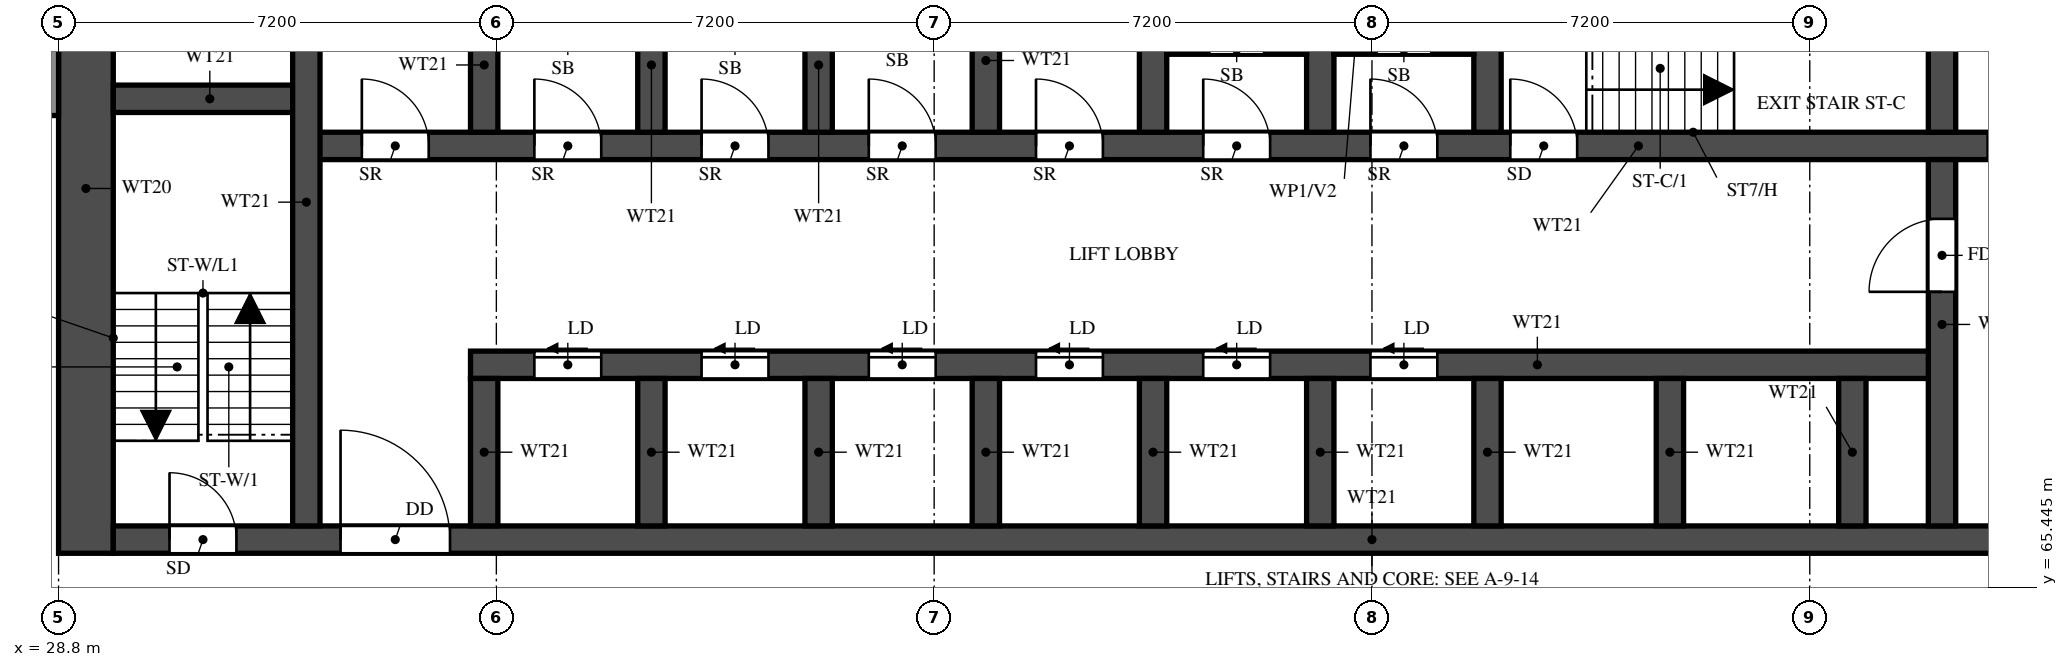
"""IFC4 building model, lengths in metres.
Left out: names, types, materials, properties, quantities, classifications, styles, units other than length and angle.
Written with IfcOpenShell. Run it as: python <this file> out.ifc"""

import sys

from ifc_helpers import new_model, si_unit, direction, frame, frame_2d, origin, place, context, subcontext, project, spatial, rectangle, extrude, element, fill, save


model = new_model("IFC4")
c1 = context("Model", 3, precision=1e-05, world=origin(), true_north=direction((0.0, 1.0)))
c2 = subcontext(c1, "Body", "Model", "MODEL_VIEW")
j1 = project(units=[si_unit("LENGTHUNIT", "METRE"), si_unit("PLANEANGLEUNIT", "RADIAN")], contexts=[c1])
p1 = place(None, origin())
s1 = spatial("IfcSite", under=j1, at=p1, CompositionType="ELEMENT")
p2 = place(p1, origin())
s2 = spatial("IfcBuilding", under=s1, at=p2, CompositionType="ELEMENT")
p3 = place(p2, frame((0.0, 0.0, 93.5)))
s3 = spatial("IfcBuildingStorey", under=s2, at=p3, CompositionType="ELEMENT", Elevation=93.5)
p4 = place(p3, frame((29.25, 66.0, 0.0), z_axis=(0.0, 0.0, 1.0), x_axis=(0.0, 1.0, 0.0)))
e1 = element("IfcWall", 1, at=p4, inside=s3, PredefinedType="SHEAR", context=c2, shape_type="SweptSolid", body=[
    extrude(rectangle(XDim=12.0, YDim=0.9, at=frame_2d((6.0, 0.0))), origin(), (0.0, 0.0, 1.0), 3.18),
])
p5 = place(p3, frame((29.7, 66.225, 0.0), z_axis=(0.0, 0.0, 1.0), x_axis=(1.0, 0.0, 0.0)))
e2 = element("IfcWall", 2, at=p5, inside=s3, PredefinedType="SHEAR", context=c2, shape_type="SweptSolid", body=[
    extrude(rectangle(XDim=41.4, YDim=0.45, at=frame_2d((20.7, 0.0))), origin(), (0.0, 0.0, 1.0), 3.18),
])
p6 = place(p5, frame((0.925, 0.0, 0.0)))
e3 = element("IfcOpeningElement", 3, at=p6, cuts=e2, PredefinedType="OPENING", context=c2, shape_type="SweptSolid", body=[
    extrude(rectangle(XDim=1.1, YDim=2.1, at=frame_2d((0.55, 1.05))), frame((0.0, 0.235, 0.0), z_axis=(0.0, -1.0, 0.0), x_axis=(1.0, 0.0, 0.0)), (0.0, 0.0, 1.0), 0.47),
])
p7 = place(p5, frame((3.738, 0.0, 0.0)))
e4 = element("IfcOpeningElement", 4, at=p7, cuts=e2, PredefinedType="OPENING", context=c2, shape_type="SweptSolid", body=[
    extrude(rectangle(XDim=1.8, YDim=2.1, at=frame_2d((0.9, 1.05))), frame((0.0, 0.235, 0.0), z_axis=(0.0, -1.0, 0.0), x_axis=(1.0, 0.0, 0.0)), (0.0, 0.0, 1.0), 0.47),
])
p8 = place(p3, frame((35.575, 69.1, 0.0), z_axis=(0.0, 0.0, 1.0), x_axis=(1.0, 0.0, 0.0)))
e5 = element("IfcWall", 5, at=p8, inside=s3, PredefinedType="SHEAR", context=c2, shape_type="SweptSolid", body=[
    extrude(rectangle(XDim=24.2, YDim=0.45, at=frame_2d((12.1, 0.0))), origin(), (0.0, 0.0, 1.0), 3.18),
])
p9 = place(p8, frame((1.05, 0.0, 0.0)))
e6 = element("IfcOpeningElement", 6, at=p9, cuts=e5, PredefinedType="OPENING", context=c2, shape_type="SweptSolid", body=[
    extrude(rectangle(XDim=1.1, YDim=2.1, at=frame_2d((0.55, 1.05))), frame((0.0, 0.235, 0.0), z_axis=(0.0, -1.0, 0.0), x_axis=(1.0, 0.0, 0.0)), (0.0, 0.0, 1.0), 0.47),
])
p10 = place(p8, frame((3.8, 0.0, 0.0)))
e7 = element("IfcOpeningElement", 7, at=p10, cuts=e5, PredefinedType="OPENING", context=c2, shape_type="SweptSolid", body=[
    extrude(rectangle(XDim=1.1, YDim=2.1, at=frame_2d((0.55, 1.05))), frame((0.0, 0.235, 0.0), z_axis=(0.0, -1.0, 0.0), x_axis=(1.0, 0.0, 0.0)), (0.0, 0.0, 1.0), 0.47),
])
p11 = place(p8, frame((6.55, 0.0, 0.0)))
e8 = element("IfcOpeningElement", 8, at=p11, cuts=e5, PredefinedType="OPENING", context=c2, shape_type="SweptSolid", body=[
    extrude(rectangle(XDim=1.1, YDim=2.1, at=frame_2d((0.55, 1.05))), frame((0.0, 0.235, 0.0), z_axis=(0.0, -1.0, 0.0), x_axis=(1.0, 0.0, 0.0)), (0.0, 0.0, 1.0), 0.47),
])
p12 = place(p8, frame((9.3, 0.0, 0.0)))
e9 = element("IfcOpeningElement", 9, at=p12, cuts=e5, PredefinedType="OPENING", context=c2, shape_type="SweptSolid", body=[
    extrude(rectangle(XDim=1.1, YDim=2.1, at=frame_2d((0.55, 1.05))), frame((0.0, 0.235, 0.0), z_axis=(0.0, -1.0, 0.0), x_axis=(1.0, 0.0, 0.0)), (0.0, 0.0, 1.0), 0.47),
])
p13 = place(p8, frame((12.05, 0.0, 0.0)))
e10 = element("IfcOpeningElement", 10, at=p13, cuts=e5, PredefinedType="OPENING", context=c2, shape_type="SweptSolid", body=[
    extrude(rectangle(XDim=1.1, YDim=2.1, at=frame_2d((0.55, 1.05))), frame((0.0, 0.235, 0.0), z_axis=(0.0, -1.0, 0.0), x_axis=(1.0, 0.0, 0.0)), (0.0, 0.0, 1.0), 0.47),
])
p14 = place(p8, frame((14.8, 0.0, 0.0)))
e11 = element("IfcOpeningElement", 11, at=p14, cuts=e5, PredefinedType="OPENING", context=c2, shape_type="SweptSolid", body=[
    extrude(rectangle(XDim=1.1, YDim=2.1, at=frame_2d((0.55, 1.05))), frame((0.0, 0.235, 0.0), z_axis=(0.0, -1.0, 0.0), x_axis=(1.0, 0.0, 0.0)), (0.0, 0.0, 1.0), 0.47),
])
p15 = place(p3, frame((32.875, 72.7, 0.0), z_axis=(0.0, 0.0, 1.0), x_axis=(1.0, 0.0, 0.0)))
e12 = element("IfcWall", 12, at=p15, inside=s3, PredefinedType="SHEAR", context=c2, shape_type="SweptSolid", body=[
    extrude(rectangle(XDim=35.05, YDim=0.45, at=frame_2d((17.525, 0.0))), origin(), (0.0, 0.0, 1.0), 3.18),
])
p16 = place(p15, frame((19.8, 0.0, 0.0)))
e13 = element("IfcOpeningElement", 13, at=p16, cuts=e12, PredefinedType="OPENING", context=c2, shape_type="SweptSolid", body=[
    extrude(rectangle(XDim=1.1, YDim=2.1, at=frame_2d((0.55, 1.05))), frame((0.0, 0.235, 0.0), z_axis=(0.0, -1.0, 0.0), x_axis=(1.0, 0.0, 0.0)), (0.0, 0.0, 1.0), 0.47),
])
p17 = place(p15, frame((27.65, 0.0, 0.0)))
e14 = element("IfcOpeningElement", 14, at=p17, cuts=e12, PredefinedType="OPENING", context=c2, shape_type="SweptSolid", body=[
    extrude(rectangle(XDim=1.1, YDim=2.1, at=frame_2d((0.55, 1.05))), frame((0.0, 0.235, 0.0), z_axis=(0.0, -1.0, 0.0), x_axis=(1.0, 0.0, 0.0)), (0.0, 0.0, 1.0), 0.47),
])
p18 = place(p15, frame((30.25, 0.0, 0.0)))
e15 = element("IfcOpeningElement", 15, at=p18, cuts=e12, PredefinedType="OPENING", context=c2, shape_type="SweptSolid", body=[
    extrude(rectangle(XDim=1.1, YDim=2.1, at=frame_2d((0.55, 1.05))), frame((0.0, 0.235, 0.0), z_axis=(0.0, -1.0, 0.0), x_axis=(1.0, 0.0, 0.0)), (0.0, 0.0, 1.0), 0.47),
])
p19 = place(p15, frame((3.75, 0.0, 0.0)))
e16 = element("IfcOpeningElement", 16, at=p19, cuts=e12, PredefinedType="OPENING", context=c2, shape_type="SweptSolid", body=[
    extrude(rectangle(XDim=1.1, YDim=2.1, at=frame_2d((0.55, 1.05))), frame((0.0, 0.235, 0.0), z_axis=(0.0, -1.0, 0.0), x_axis=(1.0, 0.0, 0.0)), (0.0, 0.0, 1.0), 0.47),
])
p20 = place(p15, frame((6.5, 0.0, 0.0)))
e17 = element("IfcOpeningElement", 17, at=p20, cuts=e12, PredefinedType="OPENING", context=c2, shape_type="SweptSolid", body=[
    extrude(rectangle(XDim=1.1, YDim=2.1, at=frame_2d((0.55, 1.05))), frame((0.0, 0.235, 0.0), z_axis=(0.0, -1.0, 0.0), x_axis=(1.0, 0.0, 0.0)), (0.0, 0.0, 1.0), 0.47),
])
p21 = place(p15, frame((9.25, 0.0, 0.0)))
e18 = element("IfcOpeningElement", 18, at=p21, cuts=e12, PredefinedType="OPENING", context=c2, shape_type="SweptSolid", body=[
    extrude(rectangle(XDim=1.1, YDim=2.1, at=frame_2d((0.55, 1.05))), frame((0.0, 0.235, 0.0), z_axis=(0.0, -1.0, 0.0), x_axis=(1.0, 0.0, 0.0)), (0.0, 0.0, 1.0), 0.47),
])
p22 = place(p15, frame((12.0, 0.0, 0.0)))
e19 = element("IfcOpeningElement", 19, at=p22, cuts=e12, PredefinedType="OPENING", context=c2, shape_type="SweptSolid", body=[
    extrude(rectangle(XDim=1.1, YDim=2.1, at=frame_2d((0.55, 1.05))), frame((0.0, 0.235, 0.0), z_axis=(0.0, -1.0, 0.0), x_axis=(1.0, 0.0, 0.0)), (0.0, 0.0, 1.0), 0.47),
])
p23 = place(p15, frame((14.75, 0.0, 0.0)))
e20 = element("IfcOpeningElement", 20, at=p23, cuts=e12, PredefinedType="OPENING", context=c2, shape_type="SweptSolid", body=[
    extrude(rectangle(XDim=1.1, YDim=2.1, at=frame_2d((0.55, 1.05))), frame((0.0, 0.235, 0.0), z_axis=(0.0, -1.0, 0.0), x_axis=(1.0, 0.0, 0.0)), (0.0, 0.0, 1.0), 0.47),
])
p24 = place(p15, frame((17.5, 0.0, 0.0)))
e21 = element("IfcOpeningElement", 21, at=p24, cuts=e12, PredefinedType="OPENING", context=c2, shape_type="SweptSolid", body=[
    extrude(rectangle(XDim=1.1, YDim=2.1, at=frame_2d((0.55, 1.05))), frame((0.0, 0.235, 0.0), z_axis=(0.0, -1.0, 0.0), x_axis=(1.0, 0.0, 0.0)), (0.0, 0.0, 1.0), 0.47),
])
p25 = place(p15, frame((0.913, 0.0, 0.0)))
e22 = element("IfcOpeningElement", 22, at=p25, cuts=e12, PredefinedType="OPENING", context=c2, shape_type="SweptSolid", body=[
    extrude(rectangle(XDim=1.1, YDim=2.1, at=frame_2d((0.55, 1.05))), frame((0.0, 0.235, 0.0), z_axis=(0.0, -1.0, 0.0), x_axis=(1.0, 0.0, 0.0)), (0.0, 0.0, 1.0), 0.47),
])
p26 = place(p3, frame((29.7, 73.475, 0.0), z_axis=(0.0, 0.0, 1.0), x_axis=(1.0, 0.0, 0.0)))
e23 = element("IfcWall", 23, at=p26, inside=s3, PredefinedType="SHEAR", context=c2, shape_type="SweptSolid", body=[
    extrude(rectangle(XDim=3.175, YDim=0.45, at=frame_2d((1.587, 0.0))), origin(), (0.0, 0.0, 1.0), 3.18),
])
p27 = place(p3, frame((32.875, 66.45, 0.0), z_axis=(0.0, 0.0, 1.0), x_axis=(0.0, 1.0, 0.0)))
e24 = element("IfcWall", 24, at=p27, inside=s3, PredefinedType="SHEAR", context=c2, shape_type="SweptSolid", body=[
    extrude(rectangle(XDim=10.65, YDim=0.45, at=frame_2d((5.325, 0.0))), origin(), (0.0, 0.0, 1.0), 3.18),
])
p28 = place(p3, frame((59.775, 66.45, 0.0), z_axis=(0.0, 0.0, 1.0), x_axis=(0.0, 1.0, 0.0)))
e25 = element("IfcWall", 25, at=p28, inside=s3, PredefinedType="SHEAR", context=c2, shape_type="SweptSolid", body=[
    extrude(rectangle(XDim=6.025, YDim=0.45, at=frame_2d((3.013, 0.0))), origin(), (0.0, 0.0, 1.0), 3.18),
])
p29 = place(p28, frame((3.85, 0.0, 0.0)))
e26 = element("IfcOpeningElement", 26, at=p29, cuts=e25, PredefinedType="OPENING", context=c2, shape_type="SweptSolid", body=[
    extrude(rectangle(XDim=1.2, YDim=2.1, at=frame_2d((0.6, 1.05))), frame((0.0, 0.235, 0.0), z_axis=(0.0, -1.0, 0.0), x_axis=(1.0, 0.0, 0.0)), (0.0, 0.0, 1.0), 0.47),
])
p30 = place(p3, frame((59.775, 72.925, 0.0), z_axis=(0.0, 0.0, 1.0), x_axis=(0.0, 1.0, 0.0)))
e27 = element("IfcWall", 27, at=p30, inside=s3, PredefinedType="SHEAR", context=c2, shape_type="SweptSolid", body=[
    extrude(rectangle(XDim=2.95, YDim=0.45, at=frame_2d((1.475, 0.0))), origin(), (0.0, 0.0, 1.0), 3.18),
])
for number, where, z_axis, x_axis in (
    (28, (35.8, 66.45, 0.0), (0.0, 0.0, 1.0), (0.0, 1.0, 0.0)),
    (29, (38.55, 66.45, 0.0), (0.0, 0.0, 1.0), (0.0, 1.0, 0.0)),
    (30, (41.3, 66.45, 0.0), (0.0, 0.0, 1.0), (0.0, 1.0, 0.0)),
    (31, (44.05, 66.45, 0.0), (0.0, 0.0, 1.0), (0.0, 1.0, 0.0)),
    (32, (46.8, 66.45, 0.0), (0.0, 0.0, 1.0), (0.0, 1.0, 0.0)),
    (33, (49.55, 66.45, 0.0), (0.0, 0.0, 1.0), (0.0, 1.0, 0.0)),
    (34, (52.3, 66.45, 0.0), (0.0, 0.0, 1.0), (0.0, 1.0, 0.0)),
    (35, (55.3, 66.45, 0.0), (0.0, 0.0, 1.0), (0.0, 1.0, 0.0)),
    (36, (58.3, 66.45, 0.0), (0.0, 0.0, 1.0), (0.0, 1.0, 0.0)),
):
    element("IfcWall", number, at=place(p3, frame(where, z_axis=z_axis, x_axis=x_axis)), inside=s3, PredefinedType="SHEAR", context=c2, shape_type="SweptSolid", body=[
        extrude(rectangle(XDim=2.425, YDim=0.45, at=frame_2d((1.212, 0.0))), origin(), (0.0, 0.0, 1.0), 3.18),
    ])
for number, where, z_axis, x_axis in (
    (37, (35.8, 72.925, 0.0), (0.0, 0.0, 1.0), (0.0, 1.0, 0.0)),
    (38, (38.55, 72.925, 0.0), (0.0, 0.0, 1.0), (0.0, 1.0, 0.0)),
    (39, (41.3, 72.925, 0.0), (0.0, 0.0, 1.0), (0.0, 1.0, 0.0)),
    (40, (44.05, 72.925, 0.0), (0.0, 0.0, 1.0), (0.0, 1.0, 0.0)),
    (41, (46.8, 72.925, 0.0), (0.0, 0.0, 1.0), (0.0, 1.0, 0.0)),
    (42, (49.55, 72.925, 0.0), (0.0, 0.0, 1.0), (0.0, 1.0, 0.0)),
    (43, (52.3, 72.925, 0.0), (0.0, 0.0, 1.0), (0.0, 1.0, 0.0)),
):
    element("IfcWall", number, at=place(p3, frame(where, z_axis=z_axis, x_axis=x_axis)), inside=s3, PredefinedType="SHEAR", context=c2, shape_type="SweptSolid", body=[
        extrude(rectangle(XDim=2.95, YDim=0.45, at=frame_2d((1.475, 0.0))), origin(), (0.0, 0.0, 1.0), 3.18),
    ])
p31 = place(p3, frame((47.025, 74.282, 0.0), z_axis=(0.0, 0.0, 1.0), x_axis=(1.0, 0.0, 0.0)))
e44 = element("IfcWall", 44, at=p31, inside=s3, PredefinedType="PARTITIONING", context=c2, shape_type="SweptSolid", body=[
    extrude(rectangle(XDim=2.3, YDim=0.15, at=frame_2d((1.15, 0.0))), origin(), (0.0, 0.0, 1.0), 3.18),
])
p32 = place(p31, frame((0.7, 0.0, 0.0)))
e45 = element("IfcOpeningElement", 45, at=p32, cuts=e44, PredefinedType="OPENING", context=c2, shape_type="SweptSolid", body=[
    extrude(rectangle(XDim=0.9, YDim=2.1, at=frame_2d((0.45, 1.05))), frame((0.0, 0.085, 0.0), z_axis=(0.0, -1.0, 0.0), x_axis=(1.0, 0.0, 0.0)), (0.0, 0.0, 1.0), 0.17),
])
p33 = place(p3, frame((49.775, 74.282, 0.0), z_axis=(0.0, 0.0, 1.0), x_axis=(1.0, 0.0, 0.0)))
e46 = element("IfcWall", 46, at=p33, inside=s3, PredefinedType="PARTITIONING", context=c2, shape_type="SweptSolid", body=[
    extrude(rectangle(XDim=2.3, YDim=0.15, at=frame_2d((1.15, 0.0))), origin(), (0.0, 0.0, 1.0), 3.18),
])
p34 = place(p33, frame((0.7, 0.0, 0.0)))
e47 = element("IfcOpeningElement", 47, at=p34, cuts=e46, PredefinedType="OPENING", context=c2, shape_type="SweptSolid", body=[
    extrude(rectangle(XDim=0.9, YDim=2.1, at=frame_2d((0.45, 1.05))), frame((0.0, 0.085, 0.0), z_axis=(0.0, -1.0, 0.0), x_axis=(1.0, 0.0, 0.0)), (0.0, 0.0, 1.0), 0.17),
])
p35 = place(p3, frame((28.7, 73.2, 0.0), z_axis=(0.0, 0.0, 1.0), x_axis=(0.0, 1.0, 0.0)))
e48 = element("IfcWall", 48, at=p35, inside=s3, PredefinedType="SOLIDWALL", context=c2, shape_type="SweptSolid", body=[
    extrude(rectangle(XDim=4.8, YDim=0.2, at=frame_2d((2.4, 0.0))), origin(), (0.0, 0.0, 1.0), 3.18),
])
p36 = place(p6, origin())
e49 = element("IfcDoor", 49, at=p36, inside=s3, OperationType="SINGLE_SWING_LEFT", PredefinedType="DOOR", context=c2, shape_type="SweptSolid", body=[
    extrude(rectangle(XDim=1.1, YDim=2.1, at=frame_2d((0.55, 1.05))), frame((0.0, 0.025, 0.0), z_axis=(0.0, -1.0, 0.0), x_axis=(1.0, 0.0, 0.0)), (0.0, 0.0, 1.0), 0.05),
])
fill(e3, e49)
p37 = place(p16, origin())
e50 = element("IfcDoor", 50, at=p37, inside=s3, OperationType="SINGLE_SWING_LEFT", PredefinedType="DOOR", context=c2, shape_type="SweptSolid", body=[
    extrude(rectangle(XDim=1.1, YDim=2.1, at=frame_2d((0.55, 1.05))), frame((0.0, 0.025, 0.0), z_axis=(0.0, -1.0, 0.0), x_axis=(1.0, 0.0, 0.0)), (0.0, 0.0, 1.0), 0.05),
])
fill(e13, e50)
p38 = place(p7, origin())
e51 = element("IfcDoor", 51, at=p38, inside=s3, OperationType="DOUBLE_DOOR_SINGLE_SWING", PredefinedType="DOOR", context=c2, shape_type="SweptSolid", body=[
    extrude(rectangle(XDim=1.8, YDim=2.1, at=frame_2d((0.9, 1.05))), frame((0.0, 0.025, 0.0), z_axis=(0.0, -1.0, 0.0), x_axis=(1.0, 0.0, 0.0)), (0.0, 0.0, 1.0), 0.05),
])
fill(e4, e51)
p39 = place(p29, origin())
e52 = element("IfcDoor", 52, at=p39, inside=s3, OperationType="SINGLE_SWING_RIGHT", PredefinedType="DOOR", context=c2, shape_type="SweptSolid", body=[
    extrude(rectangle(XDim=1.2, YDim=2.1, at=frame_2d((0.6, 1.05))), frame((0.0, 0.025, 0.0), z_axis=(0.0, -1.0, 0.0), x_axis=(1.0, 0.0, 0.0)), (0.0, 0.0, 1.0), 0.05),
])
fill(e26, e52)
p40 = place(p17, origin())
e53 = element("IfcDoor", 53, at=p40, inside=s3, OperationType="SLIDING_TO_LEFT", PredefinedType="DOOR", context=c2, shape_type="SweptSolid", body=[
    extrude(rectangle(XDim=1.1, YDim=2.1, at=frame_2d((0.55, 1.05))), frame((0.0, 0.025, 0.0), z_axis=(0.0, -1.0, 0.0), x_axis=(1.0, 0.0, 0.0)), (0.0, 0.0, 1.0), 0.05),
])
fill(e14, e53)
p41 = place(p9, origin())
e54 = element("IfcDoor", 54, at=p41, inside=s3, OperationType="SLIDING_TO_LEFT", PredefinedType="DOOR", context=c2, shape_type="SweptSolid", body=[
    extrude(rectangle(XDim=1.1, YDim=2.1, at=frame_2d((0.55, 1.05))), frame((0.0, 0.025, 0.0), z_axis=(0.0, -1.0, 0.0), x_axis=(1.0, 0.0, 0.0)), (0.0, 0.0, 1.0), 0.05),
])
fill(e6, e54)
p42 = place(p10, origin())
e55 = element("IfcDoor", 55, at=p42, inside=s3, OperationType="SLIDING_TO_LEFT", PredefinedType="DOOR", context=c2, shape_type="SweptSolid", body=[
    extrude(rectangle(XDim=1.1, YDim=2.1, at=frame_2d((0.55, 1.05))), frame((0.0, 0.025, 0.0), z_axis=(0.0, -1.0, 0.0), x_axis=(1.0, 0.0, 0.0)), (0.0, 0.0, 1.0), 0.05),
])
fill(e7, e55)
p43 = place(p11, origin())
e56 = element("IfcDoor", 56, at=p43, inside=s3, OperationType="SLIDING_TO_LEFT", PredefinedType="DOOR", context=c2, shape_type="SweptSolid", body=[
    extrude(rectangle(XDim=1.1, YDim=2.1, at=frame_2d((0.55, 1.05))), frame((0.0, 0.025, 0.0), z_axis=(0.0, -1.0, 0.0), x_axis=(1.0, 0.0, 0.0)), (0.0, 0.0, 1.0), 0.05),
])
fill(e8, e56)
p44 = place(p12, origin())
e57 = element("IfcDoor", 57, at=p44, inside=s3, OperationType="SLIDING_TO_LEFT", PredefinedType="DOOR", context=c2, shape_type="SweptSolid", body=[
    extrude(rectangle(XDim=1.1, YDim=2.1, at=frame_2d((0.55, 1.05))), frame((0.0, 0.025, 0.0), z_axis=(0.0, -1.0, 0.0), x_axis=(1.0, 0.0, 0.0)), (0.0, 0.0, 1.0), 0.05),
])
fill(e9, e57)
p45 = place(p13, origin())
e58 = element("IfcDoor", 58, at=p45, inside=s3, OperationType="SLIDING_TO_LEFT", PredefinedType="DOOR", context=c2, shape_type="SweptSolid", body=[
    extrude(rectangle(XDim=1.1, YDim=2.1, at=frame_2d((0.55, 1.05))), frame((0.0, 0.025, 0.0), z_axis=(0.0, -1.0, 0.0), x_axis=(1.0, 0.0, 0.0)), (0.0, 0.0, 1.0), 0.05),
])
fill(e10, e58)
p46 = place(p14, origin())
e59 = element("IfcDoor", 59, at=p46, inside=s3, OperationType="SLIDING_TO_LEFT", PredefinedType="DOOR", context=c2, shape_type="SweptSolid", body=[
    extrude(rectangle(XDim=1.1, YDim=2.1, at=frame_2d((0.55, 1.05))), frame((0.0, 0.025, 0.0), z_axis=(0.0, -1.0, 0.0), x_axis=(1.0, 0.0, 0.0)), (0.0, 0.0, 1.0), 0.05),
])
fill(e11, e59)
p47 = place(p19, origin())
e60 = element("IfcDoor", 60, at=p47, inside=s3, OperationType="SINGLE_SWING_LEFT", PredefinedType="DOOR", context=c2, shape_type="SweptSolid", body=[
    extrude(rectangle(XDim=1.1, YDim=2.1, at=frame_2d((0.55, 1.05))), frame((0.0, 0.025, 0.0), z_axis=(0.0, -1.0, 0.0), x_axis=(1.0, 0.0, 0.0)), (0.0, 0.0, 1.0), 0.05),
])
fill(e16, e60)
p48 = place(p20, origin())
e61 = element("IfcDoor", 61, at=p48, inside=s3, OperationType="SINGLE_SWING_LEFT", PredefinedType="DOOR", context=c2, shape_type="SweptSolid", body=[
    extrude(rectangle(XDim=1.1, YDim=2.1, at=frame_2d((0.55, 1.05))), frame((0.0, 0.025, 0.0), z_axis=(0.0, -1.0, 0.0), x_axis=(1.0, 0.0, 0.0)), (0.0, 0.0, 1.0), 0.05),
])
fill(e17, e61)
p49 = place(p21, origin())
e62 = element("IfcDoor", 62, at=p49, inside=s3, OperationType="SINGLE_SWING_LEFT", PredefinedType="DOOR", context=c2, shape_type="SweptSolid", body=[
    extrude(rectangle(XDim=1.1, YDim=2.1, at=frame_2d((0.55, 1.05))), frame((0.0, 0.025, 0.0), z_axis=(0.0, -1.0, 0.0), x_axis=(1.0, 0.0, 0.0)), (0.0, 0.0, 1.0), 0.05),
])
fill(e18, e62)
p50 = place(p22, origin())
e63 = element("IfcDoor", 63, at=p50, inside=s3, OperationType="SINGLE_SWING_LEFT", PredefinedType="DOOR", context=c2, shape_type="SweptSolid", body=[
    extrude(rectangle(XDim=1.1, YDim=2.1, at=frame_2d((0.55, 1.05))), frame((0.0, 0.025, 0.0), z_axis=(0.0, -1.0, 0.0), x_axis=(1.0, 0.0, 0.0)), (0.0, 0.0, 1.0), 0.05),
])
fill(e19, e63)
p51 = place(p23, origin())
e64 = element("IfcDoor", 64, at=p51, inside=s3, OperationType="SINGLE_SWING_LEFT", PredefinedType="DOOR", context=c2, shape_type="SweptSolid", body=[
    extrude(rectangle(XDim=1.1, YDim=2.1, at=frame_2d((0.55, 1.05))), frame((0.0, 0.025, 0.0), z_axis=(0.0, -1.0, 0.0), x_axis=(1.0, 0.0, 0.0)), (0.0, 0.0, 1.0), 0.05),
])
fill(e20, e64)
p52 = place(p24, origin())
e65 = element("IfcDoor", 65, at=p52, inside=s3, OperationType="SINGLE_SWING_LEFT", PredefinedType="DOOR", context=c2, shape_type="SweptSolid", body=[
    extrude(rectangle(XDim=1.1, YDim=2.1, at=frame_2d((0.55, 1.05))), frame((0.0, 0.025, 0.0), z_axis=(0.0, -1.0, 0.0), x_axis=(1.0, 0.0, 0.0)), (0.0, 0.0, 1.0), 0.05),
])
fill(e21, e65)
p53 = place(p25, origin())
e66 = element("IfcDoor", 66, at=p53, inside=s3, OperationType="SINGLE_SWING_LEFT", PredefinedType="DOOR", context=c2, shape_type="SweptSolid", body=[
    extrude(rectangle(XDim=1.1, YDim=2.1, at=frame_2d((0.55, 1.05))), frame((0.0, 0.025, 0.0), z_axis=(0.0, -1.0, 0.0), x_axis=(1.0, 0.0, 0.0)), (0.0, 0.0, 1.0), 0.05),
])
fill(e22, e66)
save(model, sys.argv[1])
